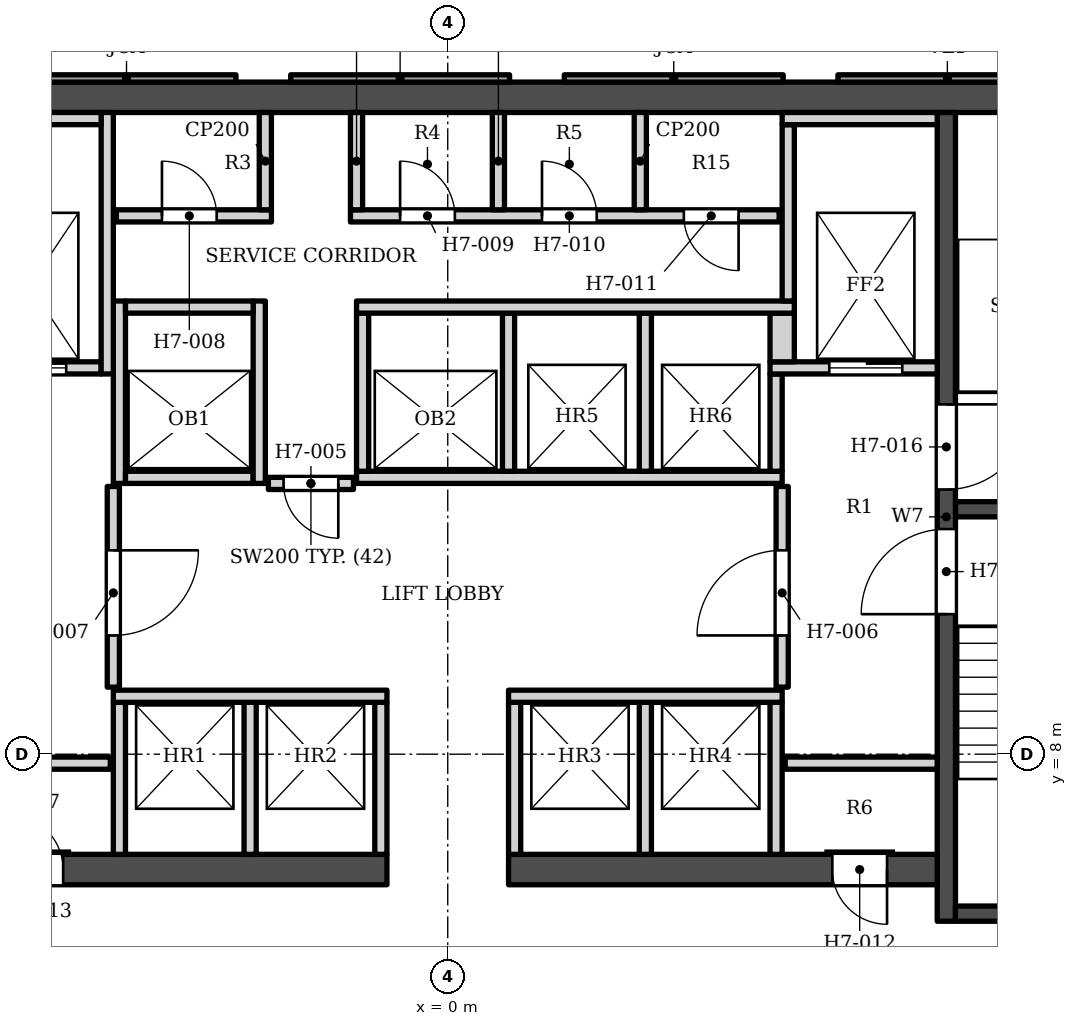
"""IFC4 building model, lengths in metres.
Left out: names, types, materials, properties, quantities, classifications, styles, units other than length and angle.
Written with IfcOpenShell. Run it as: python <this file> out.ifc"""

import sys

from ifc_helpers import new_model, si_unit, direction, frame, frame_2d, origin, place, context, subcontext, project, spatial, polyline, rectangle, outline, extrude, element, fill, save


model = new_model("IFC4")
c1 = context("Model", 3, precision=1e-05, world=origin(), true_north=direction((0.0, 1.0)))
c2 = subcontext(c1, "Body", "Model", "MODEL_VIEW")
j1 = project(units=[si_unit("LENGTHUNIT", "METRE"), si_unit("PLANEANGLEUNIT", "RADIAN")], contexts=[c1])
p1 = place(None, origin())
s1 = spatial("IfcSite", under=j1, at=p1, CompositionType="ELEMENT")
p2 = place(p1, origin())
s2 = spatial("IfcBuilding", under=s1, at=p2, CompositionType="ELEMENT")
p3 = place(p2, frame((0.0, 0.0, 112.2)))
s3 = spatial("IfcBuildingStorey", under=s2, at=p3, CompositionType="ELEMENT", Elevation=112.2)
p4 = place(p3, frame((-16.9, 18.802, 0.0), z_axis=(0.0, 0.0, 1.0), x_axis=(1.0, 0.0, 0.0)))
e1 = element("IfcWall", 1, at=p4, inside=s3, PredefinedType="SHEAR", context=c2, shape_type="SweptSolid", body=[
    extrude(rectangle(XDim=33.8, YDim=0.5, at=frame_2d((16.9, 0.0))), origin(), (0.0, 0.0, 1.0), 3.4),
])
p5 = place(p3, frame((8.2, 5.253, 0.0), z_axis=(0.0, 0.0, 1.0), x_axis=(0.0, 1.0, 0.0)))
e2 = element("IfcWall", 2, at=p5, inside=s3, PredefinedType="SHEAR", context=c2, shape_type="SweptSolid", body=[
    extrude(rectangle(XDim=13.3, YDim=0.3, at=frame_2d((6.65, 0.0))), origin(), (0.0, 0.0, 1.0), 3.4),
])
p6 = place(p5, frame((7.1, 0.0, 0.0)))
e3 = element("IfcOpeningElement", 3, at=p6, cuts=e2, PredefinedType="OPENING", context=c2, shape_type="SweptSolid", body=[
    extrude(rectangle(XDim=1.4, YDim=2.1, at=frame_2d((0.7, 1.05))), frame((0.0, 0.16, 0.0), z_axis=(0.0, -1.0, 0.0), x_axis=(1.0, 0.0, 0.0)), (0.0, 0.0, 1.0), 0.32),
])
p7 = place(p5, frame((5.05, 0.0, 0.0)))
e4 = element("IfcOpeningElement", 4, at=p7, cuts=e2, PredefinedType="OPENING", context=c2, shape_type="SweptSolid", body=[
    extrude(rectangle(XDim=1.4, YDim=2.1, at=frame_2d((0.7, 1.05))), frame((0.0, 0.16, 0.0), z_axis=(0.0, -1.0, 0.0), x_axis=(1.0, 0.0, 0.0)), (0.0, 0.0, 1.0), 0.32),
])
for number, where, z_axis, x_axis in (
    (5, (8.35, 12.028, 0.0), (0.0, 0.0, 1.0), (1.0, 0.0, 0.0)),
    (6, (8.35, 5.378, 0.0), (0.0, 0.0, 1.0), (1.0, 0.0, 0.0)),
):
    element("IfcWall", number, at=place(p3, frame(where, z_axis=z_axis, x_axis=x_axis)), inside=s3, PredefinedType="SHEAR", context=c2, shape_type="SweptSolid", body=[
        extrude(rectangle(XDim=3.75, YDim=0.25, at=frame_2d((1.875, 0.0))), origin(), (0.0, 0.0, 1.0), 3.4),
    ])
p8 = place(p3, frame((-8.05, 6.103, 0.0), z_axis=(0.0, 0.0, 1.0), x_axis=(1.0, 0.0, 0.0)))
e7 = element("IfcWall", 7, at=p8, inside=s3, PredefinedType="SHEAR", context=c2, shape_type="SweptSolid", body=[
    extrude(rectangle(XDim=7.05, YDim=0.5, at=frame_2d((3.525, 0.0))), origin(), (0.0, 0.0, 1.0), 3.4),
])
p9 = place(p8, frame((0.825, 0.0, 0.0)))
e8 = element("IfcOpeningElement", 8, at=p9, cuts=e7, PredefinedType="OPENING", context=c2, shape_type="SweptSolid", body=[
    extrude(rectangle(XDim=0.9, YDim=2.1, at=frame_2d((0.45, 1.05))), frame((0.0, 0.26, 0.0), z_axis=(0.0, -1.0, 0.0), x_axis=(1.0, 0.0, 0.0)), (0.0, 0.0, 1.0), 0.52),
])
p10 = place(p3, frame((1.0, 6.103, 0.0), z_axis=(0.0, 0.0, 1.0), x_axis=(1.0, 0.0, 0.0)))
e9 = element("IfcWall", 9, at=p10, inside=s3, PredefinedType="SHEAR", context=c2, shape_type="SweptSolid", body=[
    extrude(rectangle(XDim=7.05, YDim=0.5, at=frame_2d((3.525, 0.0))), origin(), (0.0, 0.0, 1.0), 3.4),
])
p11 = place(p10, frame((5.325, 0.0, 0.0)))
e10 = element("IfcOpeningElement", 10, at=p11, cuts=e9, PredefinedType="OPENING", context=c2, shape_type="SweptSolid", body=[
    extrude(rectangle(XDim=0.9, YDim=2.1, at=frame_2d((0.45, 1.05))), frame((0.0, 0.26, 0.0), z_axis=(0.0, -1.0, 0.0), x_axis=(1.0, 0.0, 0.0)), (0.0, 0.0, 1.0), 0.52),
])
p12 = place(p3, origin())
e11 = element("IfcWall", 11, at=p12, inside=s3, PredefinedType="ELEMENTEDWALL", context=c2, shape_type="SweptSolid", body=[
    extrude(outline(polyline([(6.417, 19.173), (6.417, 19.052), (10.017, 19.052), (10.017, 19.173), (6.417, 19.173)])), origin(), (0.0, 0.0, 1.0), 2.65),
])
p13 = place(p3, origin())
e12 = element("IfcWall", 12, at=p13, inside=s3, PredefinedType="SOLIDWALL", context=c2, shape_type="SweptSolid", body=[
    extrude(outline(polyline([(1.917, 19.173), (1.917, 19.052), (5.517, 19.052), (5.517, 19.173), (1.917, 19.173)])), origin(), (0.0, 0.0, 1.0), 2.65),
])
p14 = place(p3, origin())
e13 = element("IfcWall", 13, at=p14, inside=s3, PredefinedType="ELEMENTEDWALL", context=c2, shape_type="SweptSolid", body=[
    extrude(outline(polyline([(-2.583, 19.173), (-2.583, 19.052), (1.017, 19.052), (1.017, 19.173), (-2.583, 19.173)])), origin(), (0.0, 0.0, 1.0), 2.65),
])
p15 = place(p3, origin())
e14 = element("IfcWall", 14, at=p15, inside=s3, PredefinedType="SOLIDWALL", context=c2, shape_type="SweptSolid", body=[
    extrude(outline(polyline([(-7.083, 19.173), (-7.083, 19.052), (-3.483, 19.052), (-3.483, 19.173), (-7.083, 19.173)])), origin(), (0.0, 0.0, 1.0), 2.65),
])
for number, where, z_axis, x_axis in (
    (15, (-5.4, 6.353, 0.0), (0.0, 0.0, 1.0), (0.0, 1.0, 0.0)),
    (16, (-3.25, 6.353, 0.0), (0.0, 0.0, 1.0), (0.0, 1.0, 0.0)),
    (17, (-1.1, 6.353, 0.0), (0.0, 0.0, 1.0), (0.0, 1.0, 0.0)),
    (18, (1.1, 6.353, 0.0), (0.0, 0.0, 1.0), (0.0, 1.0, 0.0)),
    (19, (3.25, 6.353, 0.0), (0.0, 0.0, 1.0), (0.0, 1.0, 0.0)),
    (20, (5.4, 6.353, 0.0), (0.0, 0.0, 1.0), (0.0, 1.0, 0.0)),
    (21, (-8.05, 7.853, 0.0), (0.0, 0.0, 1.0), (1.0, 0.0, 0.0)),
    (22, (5.55, 7.853, 0.0), (0.0, 0.0, 1.0), (1.0, 0.0, 0.0)),
):
    element("IfcWall", number, at=place(p3, frame(where, z_axis=z_axis, x_axis=x_axis)), inside=s3, PredefinedType="SOLIDWALL", context=c2, shape_type="SweptSolid", body=[
        extrude(rectangle(XDim=2.5, YDim=0.2, at=frame_2d((1.25, 0.0))), origin(), (0.0, 0.0, 1.0), 3.23),
    ])
for number, where, z_axis, x_axis in (
    (23, (-5.5, 8.953, 0.0), (0.0, 0.0, 1.0), (1.0, 0.0, 0.0)),
    (24, (1.0, 8.953, 0.0), (0.0, 0.0, 1.0), (1.0, 0.0, 0.0)),
):
    element("IfcWall", number, at=place(p3, frame(where, z_axis=z_axis, x_axis=x_axis)), inside=s3, PredefinedType="SOLIDWALL", context=c2, shape_type="SweptSolid", body=[
        extrude(rectangle(XDim=4.5, YDim=0.2, at=frame_2d((2.25, 0.0))), origin(), (0.0, 0.0, 1.0), 3.23),
    ])
p16 = place(p3, frame((-5.5, 9.103, 0.0), z_axis=(0.0, 0.0, 1.0), x_axis=(0.0, 1.0, 0.0)))
e25 = element("IfcWall", 25, at=p16, inside=s3, PredefinedType="SOLIDWALL", context=c2, shape_type="SweptSolid", body=[
    extrude(rectangle(XDim=3.3, YDim=0.2, at=frame_2d((1.65, 0.0))), origin(), (0.0, 0.0, 1.0), 3.23),
])
p17 = place(p16, frame((0.85, 0.0, 0.0)))
e26 = element("IfcOpeningElement", 26, at=p17, cuts=e25, PredefinedType="OPENING", context=c2, shape_type="SweptSolid", body=[
    extrude(rectangle(XDim=1.4, YDim=2.1, at=frame_2d((0.7, 1.05))), frame((0.0, 0.11, 0.0), z_axis=(0.0, -1.0, 0.0), x_axis=(1.0, 0.0, 0.0)), (0.0, 0.0, 1.0), 0.22),
])
p18 = place(p3, frame((5.5, 9.103, 0.0), z_axis=(0.0, 0.0, 1.0), x_axis=(0.0, 1.0, 0.0)))
e27 = element("IfcWall", 27, at=p18, inside=s3, PredefinedType="SOLIDWALL", context=c2, shape_type="SweptSolid", body=[
    extrude(rectangle(XDim=3.3, YDim=0.2, at=frame_2d((1.65, 0.0))), origin(), (0.0, 0.0, 1.0), 3.23),
])
p19 = place(p18, frame((0.85, 0.0, 0.0)))
e28 = element("IfcOpeningElement", 28, at=p19, cuts=e27, PredefinedType="OPENING", context=c2, shape_type="SweptSolid", body=[
    extrude(rectangle(XDim=1.4, YDim=2.1, at=frame_2d((0.7, 1.05))), frame((0.0, 0.11, 0.0), z_axis=(0.0, -1.0, 0.0), x_axis=(1.0, 0.0, 0.0)), (0.0, 0.0, 1.0), 0.22),
])
p20 = place(p3, frame((-2.95, 12.453, 0.0), z_axis=(0.0, 0.0, 1.0), x_axis=(1.0, 0.0, 0.0)))
e29 = element("IfcWall", 29, at=p20, inside=s3, PredefinedType="SOLIDWALL", context=c2, shape_type="SweptSolid", body=[
    extrude(rectangle(XDim=1.4, YDim=0.2, at=frame_2d((0.7, 0.0))), origin(), (0.0, 0.0, 1.0), 3.23),
])
p21 = place(p20, frame((0.25, 0.0, 0.0)))
e30 = element("IfcOpeningElement", 30, at=p21, cuts=e29, PredefinedType="OPENING", context=c2, shape_type="SweptSolid", body=[
    extrude(rectangle(XDim=0.9, YDim=2.1, at=frame_2d((0.45, 1.05))), frame((0.0, 0.11, 0.0), z_axis=(0.0, -1.0, 0.0), x_axis=(1.0, 0.0, 0.0)), (0.0, 0.0, 1.0), 0.22),
])
p22 = place(p3, frame((-5.4, 12.453, 0.0), z_axis=(0.0, 0.0, 1.0), x_axis=(0.0, 1.0, 0.0)))
e31 = element("IfcWall", 31, at=p22, inside=s3, PredefinedType="SOLIDWALL", context=c2, shape_type="SweptSolid", body=[
    extrude(rectangle(XDim=3.0, YDim=0.2, at=frame_2d((1.5, 0.0))), origin(), (0.0, 0.0, 1.0), 3.23),
])
p23 = place(p3, frame((-5.3, 12.552, 0.0), z_axis=(0.0, 0.0, 1.0), x_axis=(1.0, 0.0, 0.0)))
e32 = element("IfcWall", 32, at=p23, inside=s3, PredefinedType="SOLIDWALL", context=c2, shape_type="SweptSolid", body=[
    extrude(rectangle(XDim=2.1, YDim=0.2, at=frame_2d((1.05, 0.0))), origin(), (0.0, 0.0, 1.0), 3.23),
])
p24 = place(p3, frame((-3.1, 12.453, 0.0), z_axis=(0.0, 0.0, 1.0), x_axis=(0.0, 1.0, 0.0)))
e33 = element("IfcWall", 33, at=p24, inside=s3, PredefinedType="SOLIDWALL", context=c2, shape_type="SweptSolid", body=[
    extrude(rectangle(XDim=3.0, YDim=0.2, at=frame_2d((1.5, 0.0))), origin(), (0.0, 0.0, 1.0), 3.23),
])
p25 = place(p3, frame((-1.5, 12.552, 0.0), z_axis=(0.0, 0.0, 1.0), x_axis=(1.0, 0.0, 0.0)))
e34 = element("IfcWall", 34, at=p25, inside=s3, PredefinedType="SOLIDWALL", context=c2, shape_type="SweptSolid", body=[
    extrude(rectangle(XDim=7.0, YDim=0.2, at=frame_2d((3.5, 0.0))), origin(), (0.0, 0.0, 1.0), 3.23),
])
for number, where, z_axis, x_axis in (
    (35, (-1.4, 12.653, 0.0), (0.0, 0.0, 1.0), (0.0, 1.0, 0.0)),
    (36, (1.0, 12.653, 0.0), (0.0, 0.0, 1.0), (0.0, 1.0, 0.0)),
    (37, (3.25, 12.653, 0.0), (0.0, 0.0, 1.0), (0.0, 1.0, 0.0)),
):
    element("IfcWall", number, at=place(p3, frame(where, z_axis=z_axis, x_axis=x_axis)), inside=s3, PredefinedType="SOLIDWALL", context=c2, shape_type="SweptSolid", body=[
        extrude(rectangle(XDim=2.6, YDim=0.2, at=frame_2d((1.3, 0.0))), origin(), (0.0, 0.0, 1.0), 3.23),
    ])
p26 = place(p3, frame((5.4, 12.653, 0.0), z_axis=(0.0, 0.0, 1.0), x_axis=(0.0, 1.0, 0.0)))
e38 = element("IfcWall", 38, at=p26, inside=s3, PredefinedType="SOLIDWALL", context=c2, shape_type="SweptSolid", body=[
    extrude(rectangle(XDim=1.6, YDim=0.2, at=frame_2d((0.8, 0.0))), origin(), (0.0, 0.0, 1.0), 3.23),
])
p27 = place(p3, frame((-8.05, 14.353, 0.0), z_axis=(0.0, 0.0, 1.0), x_axis=(1.0, 0.0, 0.0)))
e39 = element("IfcWall", 39, at=p27, inside=s3, PredefinedType="SOLIDWALL", context=c2, shape_type="SweptSolid", body=[
    extrude(rectangle(XDim=2.35, YDim=0.2, at=frame_2d((1.175, 0.0))), origin(), (0.0, 0.0, 1.0), 3.23),
])
p28 = place(p27, frame((0.575, 0.0, 0.0)))
e40 = element("IfcOpeningElement", 40, at=p28, cuts=e39, PredefinedType="OPENING", context=c2, shape_type="SweptSolid", body=[
    extrude(rectangle(XDim=1.2, YDim=2.1, at=frame_2d((0.6, 1.05))), frame((0.0, 0.11, 0.0), z_axis=(0.0, -1.0, 0.0), x_axis=(1.0, 0.0, 0.0)), (0.0, 0.0, 1.0), 0.22),
])
p29 = place(p3, frame((-5.6, 14.253, 0.0), z_axis=(0.0, 0.0, 1.0), x_axis=(0.0, 1.0, 0.0)))
e41 = element("IfcWall", 41, at=p29, inside=s3, PredefinedType="SOLIDWALL", context=c2, shape_type="SweptSolid", body=[
    extrude(rectangle(XDim=4.3, YDim=0.2, at=frame_2d((2.15, 0.0))), origin(), (0.0, 0.0, 1.0), 3.23),
])
p30 = place(p3, frame((5.3, 14.353, 0.0), z_axis=(0.0, 0.0, 1.0), x_axis=(1.0, 0.0, 0.0)))
e42 = element("IfcWall", 42, at=p30, inside=s3, PredefinedType="SOLIDWALL", context=c2, shape_type="SweptSolid", body=[
    extrude(rectangle(XDim=2.75, YDim=0.2, at=frame_2d((1.375, 0.0))), origin(), (0.0, 0.0, 1.0), 3.23),
])
p31 = place(p30, frame((0.975, 0.0, 0.0)))
e43 = element("IfcOpeningElement", 43, at=p31, cuts=e42, PredefinedType="OPENING", context=c2, shape_type="SweptSolid", body=[
    extrude(rectangle(XDim=1.2, YDim=2.1, at=frame_2d((0.6, 1.05))), frame((0.0, 0.11, 0.0), z_axis=(0.0, -1.0, 0.0), x_axis=(1.0, 0.0, 0.0)), (0.0, 0.0, 1.0), 0.22),
])
p32 = place(p3, frame((5.5, 14.453, 0.0), z_axis=(0.0, 0.0, 1.0), x_axis=(0.0, 1.0, 0.0)))
e44 = element("IfcWall", 44, at=p32, inside=s3, PredefinedType="SOLIDWALL", context=c2, shape_type="SweptSolid", body=[
    extrude(rectangle(XDim=0.8, YDim=0.4, at=frame_2d((0.4, 0.0))), origin(), (0.0, 0.0, 1.0), 3.23),
])
p33 = place(p3, frame((-5.3, 15.353, 0.0), z_axis=(0.0, 0.0, 1.0), x_axis=(1.0, 0.0, 0.0)))
e45 = element("IfcWall", 45, at=p33, inside=s3, PredefinedType="SOLIDWALL", context=c2, shape_type="SweptSolid", body=[
    extrude(rectangle(XDim=2.1, YDim=0.2, at=frame_2d((1.05, 0.0))), origin(), (0.0, 0.0, 1.0), 3.23),
])
p34 = place(p3, frame((-1.5, 15.353, 0.0), z_axis=(0.0, 0.0, 1.0), x_axis=(1.0, 0.0, 0.0)))
e46 = element("IfcWall", 46, at=p34, inside=s3, PredefinedType="SOLIDWALL", context=c2, shape_type="SweptSolid", body=[
    extrude(rectangle(XDim=7.2, YDim=0.2, at=frame_2d((3.6, 0.0))), origin(), (0.0, 0.0, 1.0), 3.23),
])
p35 = place(p3, frame((5.6, 15.453, 0.0), z_axis=(0.0, 0.0, 1.0), x_axis=(0.0, 1.0, 0.0)))
e47 = element("IfcWall", 47, at=p35, inside=s3, PredefinedType="SOLIDWALL", context=c2, shape_type="SweptSolid", body=[
    extrude(rectangle(XDim=2.9, YDim=0.2, at=frame_2d((1.45, 0.0))), origin(), (0.0, 0.0, 1.0), 3.23),
])
p36 = place(p3, frame((-5.45, 16.853, 0.0), z_axis=(0.0, 0.0, 1.0), x_axis=(1.0, 0.0, 0.0)))
e48 = element("IfcWall", 48, at=p36, inside=s3, PredefinedType="SOLIDWALL", context=c2, shape_type="SweptSolid", body=[
    extrude(rectangle(XDim=2.55, YDim=0.2, at=frame_2d((1.275, 0.0))), origin(), (0.0, 0.0, 1.0), 3.23),
])
p37 = place(p36, frame((0.75, 0.0, 0.0)))
e49 = element("IfcOpeningElement", 49, at=p37, cuts=e48, PredefinedType="OPENING", context=c2, shape_type="SweptSolid", body=[
    extrude(rectangle(XDim=0.9, YDim=2.1, at=frame_2d((0.45, 1.05))), frame((0.0, 0.11, 0.0), z_axis=(0.0, -1.0, 0.0), x_axis=(1.0, 0.0, 0.0)), (0.0, 0.0, 1.0), 0.22),
])
p38 = place(p3, frame((-1.6, 16.853, 0.0), z_axis=(0.0, 0.0, 1.0), x_axis=(1.0, 0.0, 0.0)))
e50 = element("IfcWall", 50, at=p38, inside=s3, PredefinedType="SOLIDWALL", context=c2, shape_type="SweptSolid", body=[
    extrude(rectangle(XDim=7.05, YDim=0.2, at=frame_2d((3.525, 0.0))), origin(), (0.0, 0.0, 1.0), 3.23),
])
p39 = place(p38, frame((0.817, 0.0, 0.0)))
e51 = element("IfcOpeningElement", 51, at=p39, cuts=e50, PredefinedType="OPENING", context=c2, shape_type="SweptSolid", body=[
    extrude(rectangle(XDim=0.9, YDim=2.1, at=frame_2d((0.45, 1.05))), frame((0.0, 0.11, 0.0), z_axis=(0.0, -1.0, 0.0), x_axis=(1.0, 0.0, 0.0)), (0.0, 0.0, 1.0), 0.22),
])
p40 = place(p38, frame((3.15, 0.0, 0.0)))
e52 = element("IfcOpeningElement", 52, at=p40, cuts=e50, PredefinedType="OPENING", context=c2, shape_type="SweptSolid", body=[
    extrude(rectangle(XDim=0.9, YDim=2.1, at=frame_2d((0.45, 1.05))), frame((0.0, 0.11, 0.0), z_axis=(0.0, -1.0, 0.0), x_axis=(1.0, 0.0, 0.0)), (0.0, 0.0, 1.0), 0.22),
])
p41 = place(p38, frame((5.483, 0.0, 0.0)))
e53 = element("IfcOpeningElement", 53, at=p41, cuts=e50, PredefinedType="OPENING", context=c2, shape_type="SweptSolid", body=[
    extrude(rectangle(XDim=0.9, YDim=2.1, at=frame_2d((0.45, 1.05))), frame((0.0, 0.11, 0.0), z_axis=(0.0, -1.0, 0.0), x_axis=(1.0, 0.0, 0.0)), (0.0, 0.0, 1.0), 0.22),
])
for number, where, z_axis, x_axis in (
    (54, (-3.0, 16.953, 0.0), (0.0, 0.0, 1.0), (0.0, 1.0, 0.0)),
    (55, (-1.5, 16.953, 0.0), (0.0, 0.0, 1.0), (0.0, 1.0, 0.0)),
    (56, (0.833, 16.953, 0.0), (0.0, 0.0, 1.0), (0.0, 1.0, 0.0)),
    (57, (3.167, 16.953, 0.0), (0.0, 0.0, 1.0), (0.0, 1.0, 0.0)),
):
    element("IfcWall", number, at=place(p3, frame(where, z_axis=z_axis, x_axis=x_axis)), inside=s3, PredefinedType="PARTITIONING", context=c2, shape_type="SweptSolid", body=[
        extrude(rectangle(XDim=1.6, YDim=0.2, at=frame_2d((0.8, 0.0))), origin(), (0.0, 0.0, 1.0), 3.23),
    ])
p42 = place(p3, frame((-8.05, 18.453, 0.0), z_axis=(0.0, 0.0, 1.0), x_axis=(1.0, 0.0, 0.0)))
e58 = element("IfcWall", 58, at=p42, inside=s3, PredefinedType="SOLIDWALL", context=c2, shape_type="SweptSolid", body=[
    extrude(rectangle(XDim=2.35, YDim=0.2, at=frame_2d((1.175, 0.0))), origin(), (0.0, 0.0, 1.0), 3.23),
])
p43 = place(p3, frame((5.5, 18.453, 0.0), z_axis=(0.0, 0.0, 1.0), x_axis=(1.0, 0.0, 0.0)))
e59 = element("IfcWall", 59, at=p43, inside=s3, PredefinedType="SOLIDWALL", context=c2, shape_type="SweptSolid", body=[
    extrude(rectangle(XDim=2.55, YDim=0.2, at=frame_2d((1.275, 0.0))), origin(), (0.0, 0.0, 1.0), 3.23),
])
p44 = place(p28, origin())
e60 = element("IfcDoor", 60, at=p44, inside=s3, OperationType="DOUBLE_DOOR_SLIDING", PredefinedType="DOOR", context=c2, shape_type="SweptSolid", body=[
    extrude(rectangle(XDim=1.2, YDim=2.1, at=frame_2d((0.6, 1.05))), frame((0.0, 0.025, 0.0), z_axis=(0.0, -1.0, 0.0), x_axis=(1.0, 0.0, 0.0)), (0.0, 0.0, 1.0), 0.05),
])
fill(e40, e60)
p45 = place(p31, origin())
e61 = element("IfcDoor", 61, at=p45, inside=s3, OperationType="DOUBLE_DOOR_SLIDING", PredefinedType="DOOR", context=c2, shape_type="SweptSolid", body=[
    extrude(rectangle(XDim=1.2, YDim=2.1, at=frame_2d((0.6, 1.05))), frame((0.0, 0.025, 0.0), z_axis=(0.0, -1.0, 0.0), x_axis=(1.0, 0.0, 0.0)), (0.0, 0.0, 1.0), 0.05),
])
fill(e43, e61)
p46 = place(p6, origin())
e62 = element("IfcDoor", 62, at=p46, inside=s3, OperationType="SINGLE_SWING_RIGHT", PredefinedType="DOOR", context=c2, shape_type="SweptSolid", body=[
    extrude(rectangle(XDim=1.4, YDim=2.1, at=frame_2d((0.7, 1.05))), frame((0.0, 0.025, 0.0), z_axis=(0.0, -1.0, 0.0), x_axis=(1.0, 0.0, 0.0)), (0.0, 0.0, 1.0), 0.05),
])
fill(e3, e62)
p47 = place(p7, origin())
e63 = element("IfcDoor", 63, at=p47, inside=s3, OperationType="SINGLE_SWING_LEFT", PredefinedType="DOOR", context=c2, shape_type="SweptSolid", body=[
    extrude(rectangle(XDim=1.4, YDim=2.1, at=frame_2d((0.7, 1.05))), frame((0.0, 0.025, 0.0), z_axis=(0.0, -1.0, 0.0), x_axis=(1.0, 0.0, 0.0)), (0.0, 0.0, 1.0), 0.05),
])
fill(e4, e63)
p48 = place(p21, origin())
e64 = element("IfcDoor", 64, at=p48, inside=s3, OperationType="SINGLE_SWING_RIGHT", PredefinedType="DOOR", context=c2, shape_type="SweptSolid", body=[
    extrude(rectangle(XDim=0.9, YDim=2.1, at=frame_2d((0.45, 1.05))), frame((0.0, 0.025, 0.0), z_axis=(0.0, -1.0, 0.0), x_axis=(1.0, 0.0, 0.0)), (0.0, 0.0, 1.0), 0.05),
])
fill(e30, e64)
p49 = place(p17, origin())
e65 = element("IfcDoor", 65, at=p49, inside=s3, OperationType="SINGLE_SWING_RIGHT", PredefinedType="DOOR", context=c2, shape_type="SweptSolid", body=[
    extrude(rectangle(XDim=1.4, YDim=2.1, at=frame_2d((0.7, 1.05))), frame((0.0, 0.025, 0.0), z_axis=(0.0, -1.0, 0.0), x_axis=(1.0, 0.0, 0.0)), (0.0, 0.0, 1.0), 0.05),
])
fill(e26, e65)
p50 = place(p19, origin())
e66 = element("IfcDoor", 66, at=p50, inside=s3, OperationType="SINGLE_SWING_LEFT", PredefinedType="DOOR", context=c2, shape_type="SweptSolid", body=[
    extrude(rectangle(XDim=1.4, YDim=2.1, at=frame_2d((0.7, 1.05))), frame((0.0, 0.025, 0.0), z_axis=(0.0, -1.0, 0.0), x_axis=(1.0, 0.0, 0.0)), (0.0, 0.0, 1.0), 0.05),
])
fill(e28, e66)
p51 = place(p37, origin())
e67 = element("IfcDoor", 67, at=p51, inside=s3, OperationType="SINGLE_SWING_LEFT", PredefinedType="DOOR", context=c2, shape_type="SweptSolid", body=[
    extrude(rectangle(XDim=0.9, YDim=2.1, at=frame_2d((0.45, 1.05))), frame((0.0, 0.025, 0.0), z_axis=(0.0, -1.0, 0.0), x_axis=(1.0, 0.0, 0.0)), (0.0, 0.0, 1.0), 0.05),
])
fill(e49, e67)
p52 = place(p39, origin())
e68 = element("IfcDoor", 68, at=p52, inside=s3, OperationType="SINGLE_SWING_LEFT", PredefinedType="DOOR", context=c2, shape_type="SweptSolid", body=[
    extrude(rectangle(XDim=0.9, YDim=2.1, at=frame_2d((0.45, 1.05))), frame((0.0, 0.025, 0.0), z_axis=(0.0, -1.0, 0.0), x_axis=(1.0, 0.0, 0.0)), (0.0, 0.0, 1.0), 0.05),
])
fill(e51, e68)
p53 = place(p40, origin())
e69 = element("IfcDoor", 69, at=p53, inside=s3, OperationType="SINGLE_SWING_LEFT", PredefinedType="DOOR", context=c2, shape_type="SweptSolid", body=[
    extrude(rectangle(XDim=0.9, YDim=2.1, at=frame_2d((0.45, 1.05))), frame((0.0, 0.025, 0.0), z_axis=(0.0, -1.0, 0.0), x_axis=(1.0, 0.0, 0.0)), (0.0, 0.0, 1.0), 0.05),
])
fill(e52, e69)
p54 = place(p41, origin())
e70 = element("IfcDoor", 70, at=p54, inside=s3, OperationType="SINGLE_SWING_RIGHT", PredefinedType="DOOR", context=c2, shape_type="SweptSolid", body=[
    extrude(rectangle(XDim=0.9, YDim=2.1, at=frame_2d((0.45, 1.05))), frame((0.0, 0.025, 0.0), z_axis=(0.0, -1.0, 0.0), x_axis=(1.0, 0.0, 0.0)), (0.0, 0.0, 1.0), 0.05),
])
fill(e53, e70)
p55 = place(p9, origin())
e71 = element("IfcDoor", 71, at=p55, inside=s3, OperationType="SINGLE_SWING_LEFT", PredefinedType="DOOR", context=c2, shape_type="SweptSolid", body=[
    extrude(rectangle(XDim=0.9, YDim=2.1, at=frame_2d((0.45, 1.05))), frame((0.0, 0.025, 0.0), z_axis=(0.0, -1.0, 0.0), x_axis=(1.0, 0.0, 0.0)), (0.0, 0.0, 1.0), 0.05),
])
fill(e8, e71)
p56 = place(p11, origin())
e72 = element("IfcDoor", 72, at=p56, inside=s3, OperationType="SINGLE_SWING_RIGHT", PredefinedType="DOOR", context=c2, shape_type="SweptSolid", body=[
    extrude(rectangle(XDim=0.9, YDim=2.1, at=frame_2d((0.45, 1.05))), frame((0.0, 0.025, 0.0), z_axis=(0.0, -1.0, 0.0), x_axis=(1.0, 0.0, 0.0)), (0.0, 0.0, 1.0), 0.05),
])
fill(e10, e72)
save(model, sys.argv[1])
